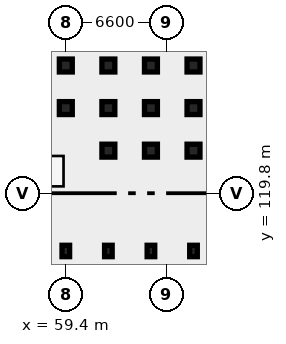
"""IFC4 building model, lengths in metres.
Left out: names, types, materials, properties, quantities, classifications, styles, units other than length and angle.
Written with IfcOpenShell. Run it as: python <this file> out.ifc"""

import sys

from ifc_helpers import new_model, si_unit, direction, frame, frame_2d, origin, origin_2d, place, context, subcontext, project, spatial, rectangle, extrude, element, fill, save


model = new_model("IFC4")
c1 = context("Model", 3, precision=1e-05, world=origin(), true_north=direction((0.0, 1.0)))
c2 = subcontext(c1, "Body", "Model", "MODEL_VIEW")
j1 = project(units=[si_unit("LENGTHUNIT", "METRE"), si_unit("PLANEANGLEUNIT", "RADIAN")], contexts=[c1])
p1 = place(None, origin())
s1 = spatial("IfcSite", under=j1, at=p1, CompositionType="ELEMENT")
p2 = place(p1, origin())
s2 = spatial("IfcBuilding", under=s1, at=p2, CompositionType="ELEMENT")
p3 = place(p2, origin())
s3 = spatial("IfcBuildingStorey", under=s2, at=p3, CompositionType="ELEMENT", Elevation=0.0)
p4 = place(p3, frame((56.65, 122.475, 0.0), z_axis=(0.0, 0.0, 1.0), x_axis=(1.0, 0.0, 0.0)))
e1 = element("IfcWall", 1, at=p4, inside=s3, PredefinedType="SHEAR", context=c2, shape_type="SweptSolid", body=[
    extrude(rectangle(XDim=2.8, YDim=0.25, at=frame_2d((1.4, 0.0))), origin(), (0.0, 0.0, 1.0), 4.15),
])
p5 = place(p3, frame((59.275, 120.15, 0.0), z_axis=(0.0, 0.0, 1.0), x_axis=(0.0, 1.0, 0.0)))
e2 = element("IfcWall", 2, at=p5, inside=s3, PredefinedType="SHEAR", context=c2, shape_type="SweptSolid", body=[
    extrude(rectangle(XDim=2.15, YDim=0.25, at=frame_2d((1.075, 0.0))), origin(), (0.0, 0.0, 1.0), 4.15),
])
p6 = place(p3, frame((59.4, 116.0, 0.0), z_axis=(0.0, 0.0, 1.0), x_axis=(1.0, 0.0, 0.0)))
e3 = element("IfcColumn", 3, at=p6, inside=s3, PredefinedType="COLUMN", context=c2, shape_type="SweptSolid", body=[
    extrude(rectangle(XDim=0.5, YDim=0.75, at=origin_2d()), origin(), (0.0, 0.0, 1.0), 4.15),
])
for number, where, z_axis, x_axis in (
    (4, (59.4, 125.4, 0.0), (0.0, 0.0, 1.0), (1.0, 0.0, 0.0)),
    (5, (59.4, 128.2, 0.0), (0.0, 0.0, 1.0), (1.0, 0.0, 0.0)),
):
    element("IfcColumn", number, at=place(p3, frame(where, z_axis=z_axis, x_axis=x_axis)), inside=s3, PredefinedType="COLUMN", context=c2, shape_type="SweptSolid", body=[
        extrude(rectangle(XDim=0.85, YDim=0.85, at=origin_2d()), origin(), (0.0, 0.0, 1.0), 4.15),
    ])
p7 = place(p3, frame((62.2, 116.0, 0.0), z_axis=(0.0, 0.0, 1.0), x_axis=(1.0, 0.0, 0.0)))
e6 = element("IfcColumn", 6, at=p7, inside=s3, PredefinedType="COLUMN", context=c2, shape_type="SweptSolid", body=[
    extrude(rectangle(XDim=0.5, YDim=0.75, at=origin_2d()), origin(), (0.0, 0.0, 1.0), 4.15),
])
for number, where, z_axis, x_axis in (
    (7, (62.2, 122.6, 0.0), (0.0, 0.0, 1.0), (1.0, 0.0, 0.0)),
    (8, (62.2, 125.4, 0.0), (0.0, 0.0, 1.0), (1.0, 0.0, 0.0)),
    (9, (62.2, 128.2, 0.0), (0.0, 0.0, 1.0), (1.0, 0.0, 0.0)),
):
    element("IfcColumn", number, at=place(p3, frame(where, z_axis=z_axis, x_axis=x_axis)), inside=s3, PredefinedType="COLUMN", context=c2, shape_type="SweptSolid", body=[
        extrude(rectangle(XDim=0.85, YDim=0.85, at=origin_2d()), origin(), (0.0, 0.0, 1.0), 4.15),
    ])
p8 = place(p3, frame((65.0, 116.0, 0.0), z_axis=(0.0, 0.0, 1.0), x_axis=(1.0, 0.0, 0.0)))
e10 = element("IfcColumn", 10, at=p8, inside=s3, PredefinedType="COLUMN", context=c2, shape_type="SweptSolid", body=[
    extrude(rectangle(XDim=0.5, YDim=0.75, at=origin_2d()), origin(), (0.0, 0.0, 1.0), 4.15),
])
for number, where, z_axis, x_axis in (
    (11, (65.0, 122.6, 0.0), (0.0, 0.0, 1.0), (1.0, 0.0, 0.0)),
    (12, (65.0, 125.4, 0.0), (0.0, 0.0, 1.0), (1.0, 0.0, 0.0)),
    (13, (65.0, 128.2, 0.0), (0.0, 0.0, 1.0), (1.0, 0.0, 0.0)),
):
    element("IfcColumn", number, at=place(p3, frame(where, z_axis=z_axis, x_axis=x_axis)), inside=s3, PredefinedType="COLUMN", context=c2, shape_type="SweptSolid", body=[
        extrude(rectangle(XDim=0.85, YDim=0.85, at=origin_2d()), origin(), (0.0, 0.0, 1.0), 4.15),
    ])
p9 = place(p3, frame((67.8, 116.0, 0.0), z_axis=(0.0, 0.0, 1.0), x_axis=(1.0, 0.0, 0.0)))
e14 = element("IfcColumn", 14, at=p9, inside=s3, PredefinedType="COLUMN", context=c2, shape_type="SweptSolid", body=[
    extrude(rectangle(XDim=0.5, YDim=0.75, at=origin_2d()), origin(), (0.0, 0.0, 1.0), 4.15),
])
for number, where, z_axis, x_axis in (
    (15, (67.8, 122.6, 0.0), (0.0, 0.0, 1.0), (1.0, 0.0, 0.0)),
    (16, (67.8, 125.4, 0.0), (0.0, 0.0, 1.0), (1.0, 0.0, 0.0)),
    (17, (67.8, 128.2, 0.0), (0.0, 0.0, 1.0), (1.0, 0.0, 0.0)),
):
    element("IfcColumn", number, at=place(p3, frame(where, z_axis=z_axis, x_axis=x_axis)), inside=s3, PredefinedType="COLUMN", context=c2, shape_type="SweptSolid", body=[
        extrude(rectangle(XDim=0.85, YDim=0.85, at=origin_2d()), origin(), (0.0, 0.0, 1.0), 4.15),
    ])
p10 = place(p3, frame((53.7, 116.02, 0.0), z_axis=(0.0, 0.0, 1.0), x_axis=(1.0, 0.0, 0.0)))
e18 = element("IfcWall", 18, at=p10, inside=s3, PredefinedType="STANDARD", context=c2, shape_type="SweptSolid", body=[
    extrude(rectangle(XDim=5.65, YDim=0.2, at=frame_2d((2.825, 0.0))), origin(), (0.0, 0.0, 1.0), 3.492),
])
p11 = place(p10, frame((1.923, 0.0, 0.0)))
e19 = element("IfcOpeningElement", 19, at=p11, cuts=e18, PredefinedType="OPENING", context=c2, shape_type="SweptSolid", body=[
    extrude(rectangle(XDim=1.24, YDim=2.15, at=frame_2d((0.62, 1.075))), frame((0.0, 0.11, 0.0), z_axis=(0.0, -1.0, 0.0), x_axis=(1.0, 0.0, 0.0)), (0.0, 0.0, 1.0), 0.22),
])
p12 = place(p3, frame((59.35, 116.02, 0.0), z_axis=(0.0, 0.0, 1.0), x_axis=(0.0, 1.0, 0.0)))
e20 = element("IfcWall", 20, at=p12, inside=s3, PredefinedType="STANDARD", context=c2, shape_type="SweptSolid", body=[
    extrude(rectangle(XDim=4.13, YDim=0.2, at=frame_2d((2.065, 0.0))), origin(), (0.0, 0.0, 1.0), 3.492),
])
p13 = place(p3, frame((56.7, 120.15, 0.0), z_axis=(0.0, 0.0, 1.0), x_axis=(1.0, 0.0, 0.0)))
e21 = element("IfcWall", 21, at=p13, inside=s3, PredefinedType="STANDARD", context=c2, shape_type="SweptSolid", body=[
    extrude(rectangle(XDim=2.55, YDim=0.2, at=frame_2d((1.275, 0.0))), origin(), (0.0, 0.0, 1.0), 3.492),
])
p14 = place(p13, frame((0.725, 0.0, 0.0)))
e22 = element("IfcOpeningElement", 22, at=p14, cuts=e21, PredefinedType="OPENING", context=c2, shape_type="SweptSolid", body=[
    extrude(rectangle(XDim=1.1, YDim=2.15, at=frame_2d((0.55, 1.075))), frame((0.0, 0.11, 0.0), z_axis=(0.0, -1.0, 0.0), x_axis=(1.0, 0.0, 0.0)), (0.0, 0.0, 1.0), 0.22),
])
p15 = place(p3, frame((59.4, 116.0, 0.0), z_axis=(0.0, 0.0, 1.0), x_axis=(1.0, 0.0, 0.0)))
e23 = element("IfcWall", 23, at=p15, inside=s3, PredefinedType="STANDARD", context=c2, shape_type="SweptSolid", body=[
    extrude(rectangle(XDim=2.8, YDim=0.2, at=frame_2d((1.4, 0.0))), origin(), (0.0, 0.0, 1.0), 3.492),
])
p16 = place(p15, frame((0.9, 0.0, 0.0)))
e24 = element("IfcOpeningElement", 24, at=p16, cuts=e23, PredefinedType="OPENING", context=c2, shape_type="SweptSolid", body=[
    extrude(rectangle(XDim=1.0, YDim=2.15, at=frame_2d((0.5, 1.075))), frame((0.0, 0.11, 0.0), z_axis=(0.0, -1.0, 0.0), x_axis=(1.0, 0.0, 0.0)), (0.0, 0.0, 1.0), 0.22),
])
p17 = place(p3, frame((59.48, 128.2, 0.0), z_axis=(0.0, 0.0, 1.0), x_axis=(1.0, 0.0, 0.0)))
e25 = element("IfcWall", 25, at=p17, inside=s3, PredefinedType="PLUMBINGWALL", context=c2, shape_type="SweptSolid", body=[
    extrude(rectangle(XDim=2.64, YDim=0.16, at=frame_2d((1.32, 0.0))), origin(), (0.0, 0.0, 1.0), 3.492),
])
p18 = place(p17, frame((0.87, 0.0, 0.0)))
e26 = element("IfcOpeningElement", 26, at=p18, cuts=e25, PredefinedType="OPENING", context=c2, shape_type="SweptSolid", body=[
    extrude(rectangle(XDim=0.9, YDim=2.1, at=frame_2d((0.45, 1.05))), frame((0.0, 0.09, 0.0), z_axis=(0.0, -1.0, 0.0), x_axis=(1.0, 0.0, 0.0)), (0.0, 0.0, 1.0), 0.18),
])
p19 = place(p3, frame((62.2, 116.0, 0.0), z_axis=(0.0, 0.0, 1.0), x_axis=(1.0, 0.0, 0.0)))
e27 = element("IfcWall", 27, at=p19, inside=s3, PredefinedType="STANDARD", context=c2, shape_type="SweptSolid", body=[
    extrude(rectangle(XDim=2.8, YDim=0.2, at=frame_2d((1.4, 0.0))), origin(), (0.0, 0.0, 1.0), 3.492),
])
p20 = place(p3, frame((62.28, 128.2, 0.0), z_axis=(0.0, 0.0, 1.0), x_axis=(1.0, 0.0, 0.0)))
e28 = element("IfcWall", 28, at=p20, inside=s3, PredefinedType="PLUMBINGWALL", context=c2, shape_type="SweptSolid", body=[
    extrude(rectangle(XDim=2.64, YDim=0.16, at=frame_2d((1.32, 0.0))), origin(), (0.0, 0.0, 1.0), 3.492),
])
p21 = place(p20, frame((0.92, 0.0, 0.0)))
e29 = element("IfcOpeningElement", 29, at=p21, cuts=e28, PredefinedType="OPENING", context=c2, shape_type="SweptSolid", body=[
    extrude(rectangle(XDim=0.8, YDim=2.1, at=frame_2d((0.4, 1.05))), frame((0.0, 0.09, 0.0), z_axis=(0.0, -1.0, 0.0), x_axis=(1.0, 0.0, 0.0)), (0.0, 0.0, 1.0), 0.18),
])
p22 = place(p3, frame((65.0, 116.0, 0.0), z_axis=(0.0, 0.0, 1.0), x_axis=(1.0, 0.0, 0.0)))
e30 = element("IfcWall", 30, at=p22, inside=s3, PredefinedType="STANDARD", context=c2, shape_type="SweptSolid", body=[
    extrude(rectangle(XDim=2.8, YDim=0.2, at=frame_2d((1.4, 0.0))), origin(), (0.0, 0.0, 1.0), 3.492),
])
p23 = place(p22, frame((0.9, 0.0, 0.0)))
e31 = element("IfcOpeningElement", 31, at=p23, cuts=e30, PredefinedType="OPENING", context=c2, shape_type="SweptSolid", body=[
    extrude(rectangle(XDim=1.0, YDim=2.15, at=frame_2d((0.5, 1.075))), frame((0.0, 0.11, 0.0), z_axis=(0.0, -1.0, 0.0), x_axis=(1.0, 0.0, 0.0)), (0.0, 0.0, 1.0), 0.22),
])
p24 = place(p3, frame((65.08, 128.2, 0.0), z_axis=(0.0, 0.0, 1.0), x_axis=(1.0, 0.0, 0.0)))
e32 = element("IfcWall", 32, at=p24, inside=s3, PredefinedType="PLUMBINGWALL", context=c2, shape_type="SweptSolid", body=[
    extrude(rectangle(XDim=2.64, YDim=0.16, at=frame_2d((1.32, 0.0))), origin(), (0.0, 0.0, 1.0), 3.492),
])
p25 = place(p24, frame((0.87, 0.0, 0.0)))
e33 = element("IfcOpeningElement", 33, at=p25, cuts=e32, PredefinedType="OPENING", context=c2, shape_type="SweptSolid", body=[
    extrude(rectangle(XDim=0.9, YDim=2.1, at=frame_2d((0.45, 1.05))), frame((0.0, 0.09, 0.0), z_axis=(0.0, -1.0, 0.0), x_axis=(1.0, 0.0, 0.0)), (0.0, 0.0, 1.0), 0.18),
])
p26 = place(p3, frame((67.8, 116.0, 0.0), z_axis=(0.0, 0.0, 1.0), x_axis=(1.0, 0.0, 0.0)))
e34 = element("IfcWall", 34, at=p26, inside=s3, PredefinedType="STANDARD", context=c2, shape_type="SweptSolid", body=[
    extrude(rectangle(XDim=2.8, YDim=0.2, at=frame_2d((1.4, 0.0))), origin(), (0.0, 0.0, 1.0), 3.492),
])
p27 = place(p3, frame((67.88, 128.2, 0.0), z_axis=(0.0, 0.0, 1.0), x_axis=(1.0, 0.0, 0.0)))
e35 = element("IfcWall", 35, at=p27, inside=s3, PredefinedType="PLUMBINGWALL", context=c2, shape_type="SweptSolid", body=[
    extrude(rectangle(XDim=2.64, YDim=0.16, at=frame_2d((1.32, 0.0))), origin(), (0.0, 0.0, 1.0), 3.492),
])
p28 = place(p27, frame((0.92, 0.0, 0.0)))
e36 = element("IfcOpeningElement", 36, at=p28, cuts=e35, PredefinedType="OPENING", context=c2, shape_type="SweptSolid", body=[
    extrude(rectangle(XDim=0.8, YDim=2.1, at=frame_2d((0.4, 1.05))), frame((0.0, 0.09, 0.0), z_axis=(0.0, -1.0, 0.0), x_axis=(1.0, 0.0, 0.0)), (0.0, 0.0, 1.0), 0.18),
])
p29 = place(p3, frame((59.4, 122.7, 0.0), z_axis=(0.0, 0.0, 1.0), x_axis=(0.0, 1.0, 0.0)))
e37 = element("IfcWall", 37, at=p29, inside=s3, PredefinedType="PARTITIONING", context=c2, shape_type="SweptSolid", body=[
    extrude(rectangle(XDim=10.82, YDim=0.15, at=frame_2d((5.41, 0.0))), origin(), (0.0, 0.0, 1.0), 3.492),
])
p30 = place(p29, frame((0.899, 0.0, 0.0)))
e38 = element("IfcOpeningElement", 38, at=p30, cuts=e37, PredefinedType="OPENING", context=c2, shape_type="SweptSolid", body=[
    extrude(rectangle(XDim=0.8, YDim=2.1, at=frame_2d((0.4, 1.05))), frame((0.0, 0.085, 0.0), z_axis=(0.0, -1.0, 0.0), x_axis=(1.0, 0.0, 0.0)), (0.0, 0.0, 1.0), 0.17),
])
p31 = place(p3, frame((62.2, 116.05, 0.0), z_axis=(0.0, 0.0, 1.0), x_axis=(0.0, 1.0, 0.0)))
e39 = element("IfcWall", 39, at=p31, inside=s3, PredefinedType="PARTITIONING", context=c2, shape_type="SweptSolid", body=[
    extrude(rectangle(XDim=6.53, YDim=0.15, at=frame_2d((3.265, 0.0))), origin(), (0.0, 0.0, 1.0), 3.492),
])
p32 = place(p31, frame((2.815, 0.0, 0.0)))
e40 = element("IfcOpeningElement", 40, at=p32, cuts=e39, PredefinedType="OPENING", context=c2, shape_type="SweptSolid", body=[
    extrude(rectangle(XDim=0.9, YDim=2.1, at=frame_2d((0.45, 1.05))), frame((0.0, 0.085, 0.0), z_axis=(0.0, -1.0, 0.0), x_axis=(1.0, 0.0, 0.0)), (0.0, 0.0, 1.0), 0.17),
])
p33 = place(p3, frame((62.2, 122.7, 0.0), z_axis=(0.0, 0.0, 1.0), x_axis=(0.0, 1.0, 0.0)))
e41 = element("IfcWall", 41, at=p33, inside=s3, PredefinedType="PARTITIONING", context=c2, shape_type="SweptSolid", body=[
    extrude(rectangle(XDim=10.82, YDim=0.15, at=frame_2d((5.41, 0.0))), origin(), (0.0, 0.0, 1.0), 3.492),
])
p34 = place(p33, frame((0.899, 0.0, 0.0)))
e42 = element("IfcOpeningElement", 42, at=p34, cuts=e41, PredefinedType="OPENING", context=c2, shape_type="SweptSolid", body=[
    extrude(rectangle(XDim=0.8, YDim=2.1, at=frame_2d((0.4, 1.05))), frame((0.0, 0.085, 0.0), z_axis=(0.0, -1.0, 0.0), x_axis=(1.0, 0.0, 0.0)), (0.0, 0.0, 1.0), 0.17),
])
p35 = place(p3, frame((65.0, 116.05, 0.0), z_axis=(0.0, 0.0, 1.0), x_axis=(0.0, 1.0, 0.0)))
e43 = element("IfcWall", 43, at=p35, inside=s3, PredefinedType="STANDARD", context=c2, shape_type="SweptSolid", body=[
    extrude(rectangle(XDim=6.53, YDim=0.22, at=frame_2d((3.265, 0.0))), origin(), (0.0, 0.0, 1.0), 3.492),
])
p36 = place(p3, frame((65.0, 122.7, 0.0), z_axis=(0.0, 0.0, 1.0), x_axis=(0.0, 1.0, 0.0)))
e44 = element("IfcWall", 44, at=p36, inside=s3, PredefinedType="STANDARD", context=c2, shape_type="SweptSolid", body=[
    extrude(rectangle(XDim=10.82, YDim=0.22, at=frame_2d((5.41, 0.0))), origin(), (0.0, 0.0, 1.0), 3.492),
])
p37 = place(p3, frame((67.8, 116.05, 0.0), z_axis=(0.0, 0.0, 1.0), x_axis=(0.0, 1.0, 0.0)))
e45 = element("IfcWall", 45, at=p37, inside=s3, PredefinedType="PARTITIONING", context=c2, shape_type="SweptSolid", body=[
    extrude(rectangle(XDim=6.53, YDim=0.15, at=frame_2d((3.265, 0.0))), origin(), (0.0, 0.0, 1.0), 3.492),
])
p38 = place(p37, frame((2.815, 0.0, 0.0)))
e46 = element("IfcOpeningElement", 46, at=p38, cuts=e45, PredefinedType="OPENING", context=c2, shape_type="SweptSolid", body=[
    extrude(rectangle(XDim=0.9, YDim=2.1, at=frame_2d((0.45, 1.05))), frame((0.0, 0.085, 0.0), z_axis=(0.0, -1.0, 0.0), x_axis=(1.0, 0.0, 0.0)), (0.0, 0.0, 1.0), 0.17),
])
p39 = place(p3, frame((67.8, 122.7, 0.0), z_axis=(0.0, 0.0, 1.0), x_axis=(0.0, 1.0, 0.0)))
e47 = element("IfcWall", 47, at=p39, inside=s3, PredefinedType="PARTITIONING", context=c2, shape_type="SweptSolid", body=[
    extrude(rectangle(XDim=10.82, YDim=0.15, at=frame_2d((5.41, 0.0))), origin(), (0.0, 0.0, 1.0), 3.492),
])
p40 = place(p39, frame((0.899, 0.0, 0.0)))
e48 = element("IfcOpeningElement", 48, at=p40, cuts=e47, PredefinedType="OPENING", context=c2, shape_type="SweptSolid", body=[
    extrude(rectangle(XDim=0.8, YDim=2.1, at=frame_2d((0.4, 1.05))), frame((0.0, 0.085, 0.0), z_axis=(0.0, -1.0, 0.0), x_axis=(1.0, 0.0, 0.0)), (0.0, 0.0, 1.0), 0.17),
])
p41 = place(p14, origin())
e49 = element("IfcDoor", 49, at=p41, inside=s3, OperationType="SLIDING_TO_LEFT", PredefinedType="DOOR", context=c2, shape_type="SweptSolid", body=[
    extrude(rectangle(XDim=1.1, YDim=2.15, at=frame_2d((0.55, 1.075))), frame((0.0, 0.025, 0.0), z_axis=(0.0, -1.0, 0.0), x_axis=(1.0, 0.0, 0.0)), (0.0, 0.0, 1.0), 0.05),
])
fill(e22, e49)
p42 = place(p18, frame((0.9, 0.0, 0.0), z_axis=(0.0, 0.0, 1.0), x_axis=(-1.0, 0.0, 0.0)))
e50 = element("IfcDoor", 50, at=p42, inside=s3, OperationType="SINGLE_SWING_RIGHT", PredefinedType="DOOR", context=c2, shape_type="SweptSolid", body=[
    extrude(rectangle(XDim=0.9, YDim=2.1, at=frame_2d((0.45, 1.05))), frame((0.0, 0.025, 0.0), z_axis=(0.0, -1.0, 0.0), x_axis=(1.0, 0.0, 0.0)), (0.0, 0.0, 1.0), 0.05),
])
fill(e26, e50)
p43 = place(p16, origin())
e51 = element("IfcDoor", 51, at=p43, inside=s3, OperationType="SINGLE_SWING_LEFT", PredefinedType="DOOR", context=c2, shape_type="SweptSolid", body=[
    extrude(rectangle(XDim=1.0, YDim=2.15, at=frame_2d((0.5, 1.075))), frame((0.0, 0.025, 0.0), z_axis=(0.0, -1.0, 0.0), x_axis=(1.0, 0.0, 0.0)), (0.0, 0.0, 1.0), 0.05),
])
fill(e24, e51)
p44 = place(p21, frame((0.8, 0.0, 0.0), z_axis=(0.0, 0.0, 1.0), x_axis=(-1.0, 0.0, 0.0)))
e52 = element("IfcDoor", 52, at=p44, inside=s3, OperationType="SINGLE_SWING_RIGHT", PredefinedType="DOOR", context=c2, shape_type="SweptSolid", body=[
    extrude(rectangle(XDim=0.8, YDim=2.1, at=frame_2d((0.4, 1.05))), frame((0.0, 0.025, 0.0), z_axis=(0.0, -1.0, 0.0), x_axis=(1.0, 0.0, 0.0)), (0.0, 0.0, 1.0), 0.05),
])
fill(e29, e52)
p45 = place(p25, frame((0.9, 0.0, 0.0), z_axis=(0.0, 0.0, 1.0), x_axis=(-1.0, 0.0, 0.0)))
e53 = element("IfcDoor", 53, at=p45, inside=s3, OperationType="SINGLE_SWING_RIGHT", PredefinedType="DOOR", context=c2, shape_type="SweptSolid", body=[
    extrude(rectangle(XDim=0.9, YDim=2.1, at=frame_2d((0.45, 1.05))), frame((0.0, 0.025, 0.0), z_axis=(0.0, -1.0, 0.0), x_axis=(1.0, 0.0, 0.0)), (0.0, 0.0, 1.0), 0.05),
])
fill(e33, e53)
p46 = place(p23, origin())
e54 = element("IfcDoor", 54, at=p46, inside=s3, OperationType="SINGLE_SWING_LEFT", PredefinedType="DOOR", context=c2, shape_type="SweptSolid", body=[
    extrude(rectangle(XDim=1.0, YDim=2.15, at=frame_2d((0.5, 1.075))), frame((0.0, 0.025, 0.0), z_axis=(0.0, -1.0, 0.0), x_axis=(1.0, 0.0, 0.0)), (0.0, 0.0, 1.0), 0.05),
])
fill(e31, e54)
p47 = place(p30, origin())
e55 = element("IfcDoor", 55, at=p47, inside=s3, OperationType="SINGLE_SWING_LEFT", PredefinedType="DOOR", context=c2, shape_type="SweptSolid", body=[
    extrude(rectangle(XDim=0.8, YDim=2.1, at=frame_2d((0.4, 1.05))), frame((0.0, 0.025, 0.0), z_axis=(0.0, -1.0, 0.0), x_axis=(1.0, 0.0, 0.0)), (0.0, 0.0, 1.0), 0.05),
])
fill(e38, e55)
p48 = place(p32, origin())
e56 = element("IfcDoor", 56, at=p48, inside=s3, OperationType="SINGLE_SWING_LEFT", PredefinedType="DOOR", context=c2, shape_type="SweptSolid", body=[
    extrude(rectangle(XDim=0.9, YDim=2.1, at=frame_2d((0.45, 1.05))), frame((0.0, 0.025, 0.0), z_axis=(0.0, -1.0, 0.0), x_axis=(1.0, 0.0, 0.0)), (0.0, 0.0, 1.0), 0.05),
])
fill(e40, e56)
p49 = place(p34, frame((0.8, 0.0, 0.0), z_axis=(0.0, 0.0, 1.0), x_axis=(-1.0, 0.0, 0.0)))
e57 = element("IfcDoor", 57, at=p49, inside=s3, OperationType="SINGLE_SWING_RIGHT", PredefinedType="DOOR", context=c2, shape_type="SweptSolid", body=[
    extrude(rectangle(XDim=0.8, YDim=2.1, at=frame_2d((0.4, 1.05))), frame((0.0, 0.025, 0.0), z_axis=(0.0, -1.0, 0.0), x_axis=(1.0, 0.0, 0.0)), (0.0, 0.0, 1.0), 0.05),
])
fill(e42, e57)
p50 = place(p38, frame((0.9, 0.0, 0.0), z_axis=(0.0, 0.0, 1.0), x_axis=(-1.0, 0.0, 0.0)))
e58 = element("IfcDoor", 58, at=p50, inside=s3, OperationType="SINGLE_SWING_RIGHT", PredefinedType="DOOR", context=c2, shape_type="SweptSolid", body=[
    extrude(rectangle(XDim=0.9, YDim=2.1, at=frame_2d((0.45, 1.05))), frame((0.0, 0.025, 0.0), z_axis=(0.0, -1.0, 0.0), x_axis=(1.0, 0.0, 0.0)), (0.0, 0.0, 1.0), 0.05),
])
fill(e46, e58)
p51 = place(p40, origin())
e59 = element("IfcDoor", 59, at=p51, inside=s3, OperationType="SINGLE_SWING_LEFT", PredefinedType="DOOR", context=c2, shape_type="SweptSolid", body=[
    extrude(rectangle(XDim=0.8, YDim=2.1, at=frame_2d((0.4, 1.05))), frame((0.0, 0.025, 0.0), z_axis=(0.0, -1.0, 0.0), x_axis=(1.0, 0.0, 0.0)), (0.0, 0.0, 1.0), 0.05),
])
fill(e48, e59)
save(model, sys.argv[1])
